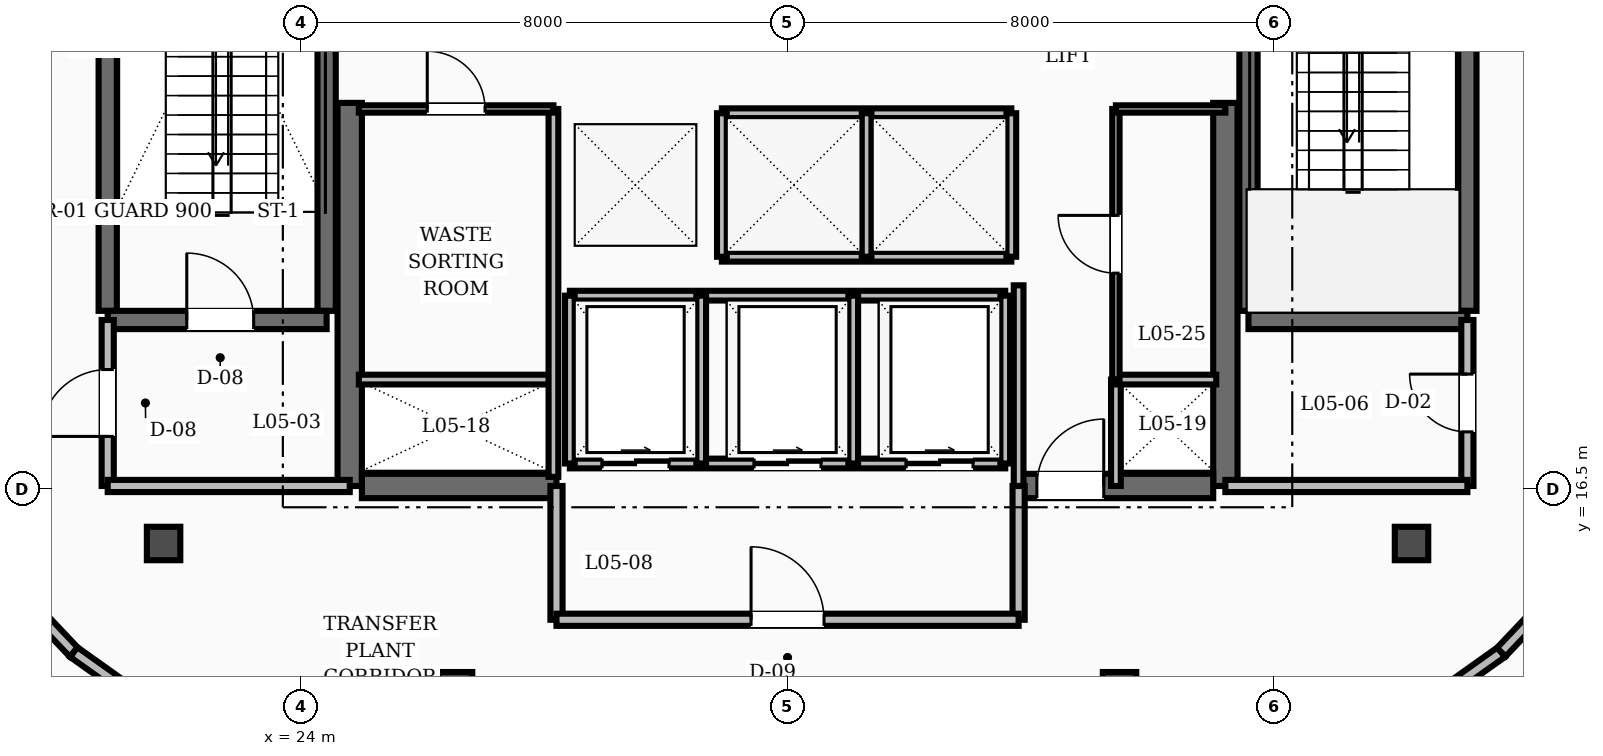
"""IFC4 building model, lengths in metres.
Left out: names, types, materials, properties, quantities, classifications, styles, units other than length and angle.
Written with IfcOpenShell. Run it as: python <this file> out.ifc"""

import sys

from ifc_helpers import new_model, si_unit, direction, frame, frame_2d, origin, place, context, subcontext, project, spatial, rectangle, extrude, element, fill, save


model = new_model("IFC4")
c1 = context("Model", 3, precision=1e-05, world=origin(), true_north=direction((0.0, 1.0)))
c2 = subcontext(c1, "Body", "Model", "MODEL_VIEW")
j1 = project(units=[si_unit("LENGTHUNIT", "METRE"), si_unit("PLANEANGLEUNIT", "RADIAN")], contexts=[c1])
p1 = place(None, origin())
s1 = spatial("IfcSite", under=j1, at=p1, CompositionType="ELEMENT")
p2 = place(p1, origin())
s2 = spatial("IfcBuilding", under=s1, at=p2, CompositionType="ELEMENT")
p3 = place(p2, frame((0.0, 0.0, 24.4)))
s3 = spatial("IfcBuildingStorey", under=s2, at=p3, CompositionType="ELEMENT", Elevation=24.4)
for number, where, z_axis, x_axis in (
    (1, (24.8, 16.55, 0.0), (0.0, 0.0, 1.0), (0.0, 1.0, 0.0)),
    (2, (39.2, 16.55, 0.0), (0.0, 0.0, 1.0), (0.0, 1.0, 0.0)),
):
    element("IfcWall", number, at=place(p3, frame(where, z_axis=z_axis, x_axis=x_axis)), inside=s3, PredefinedType="SHEAR", context=c2, shape_type="SweptSolid", body=[
        extrude(rectangle(XDim=6.3, YDim=0.4, at=frame_2d((3.15, 0.0))), origin(), (0.0, 0.0, 1.0), 6.0),
    ])
p4 = place(p3, frame((25.0, 16.55, 0.0), z_axis=(0.0, 0.0, 1.0), x_axis=(1.0, 0.0, 0.0)))
e3 = element("IfcWall", 3, at=p4, inside=s3, PredefinedType="SHEAR", context=c2, shape_type="SweptSolid", body=[
    extrude(rectangle(XDim=3.2, YDim=0.4, at=frame_2d((1.6, 0.0))), origin(), (0.0, 0.0, 1.0), 6.0),
])
p5 = place(p3, frame((35.8, 16.55, 0.0), z_axis=(0.0, 0.0, 1.0), x_axis=(1.0, 0.0, 0.0)))
e4 = element("IfcWall", 4, at=p5, inside=s3, PredefinedType="SHEAR", context=c2, shape_type="SweptSolid", body=[
    extrude(rectangle(XDim=3.2, YDim=0.4, at=frame_2d((1.6, 0.0))), origin(), (0.0, 0.0, 1.0), 6.0),
])
p6 = place(p5, frame((0.3, 0.0, 0.0)))
e5 = element("IfcOpeningElement", 5, at=p6, cuts=e4, PredefinedType="OPENING", context=c2, shape_type="SweptSolid", body=[
    extrude(rectangle(XDim=1.1, YDim=2.1, at=frame_2d((0.55, 1.05))), frame((0.0, 0.21, 0.0), z_axis=(0.0, -1.0, 0.0), x_axis=(1.0, 0.0, 0.0)), (0.0, 0.0, 1.0), 0.42),
])
for number, where, z_axis, x_axis in (
    (6, (20.82, 19.43, 0.0), (0.0, 0.0, 1.0), (0.0, 1.0, 0.0)),
    (7, (24.42, 19.43, 0.0), (0.0, 0.0, 1.0), (0.0, 1.0, 0.0)),
):
    element("IfcWall", number, at=place(p3, frame(where, z_axis=z_axis, x_axis=x_axis)), inside=s3, PredefinedType="SHEAR", context=c2, shape_type="SweptSolid", body=[
        extrude(rectangle(XDim=8.74, YDim=0.3, at=frame_2d((4.37, 0.0))), origin(), (0.0, 0.0, 1.0), 6.0),
    ])
p7 = place(p3, frame((20.82, 19.28, 0.0), z_axis=(0.0, 0.0, 1.0), x_axis=(1.0, 0.0, 0.0)))
e8 = element("IfcWall", 8, at=p7, inside=s3, PredefinedType="SHEAR", context=c2, shape_type="SweptSolid", body=[
    extrude(rectangle(XDim=3.6, YDim=0.3, at=frame_2d((1.8, 0.0))), origin(), (0.0, 0.0, 1.0), 6.0),
])
p8 = place(p7, frame((1.3, 0.0, 0.0)))
e9 = element("IfcOpeningElement", 9, at=p8, cuts=e8, PredefinedType="OPENING", context=c2, shape_type="SweptSolid", body=[
    extrude(rectangle(XDim=1.1, YDim=2.1, at=frame_2d((0.55, 1.05))), frame((0.0, 0.16, 0.0), z_axis=(0.0, -1.0, 0.0), x_axis=(1.0, 0.0, 0.0)), (0.0, 0.0, 1.0), 0.32),
])
for number, where, z_axis, x_axis in (
    (10, (43.18, 19.43, 0.0), (0.0, 0.0, 1.0), (0.0, 1.0, 0.0)),
    (11, (39.58, 19.43, 0.0), (0.0, 0.0, 1.0), (0.0, 1.0, 0.0)),
):
    element("IfcWall", number, at=place(p3, frame(where, z_axis=z_axis, x_axis=x_axis)), inside=s3, PredefinedType="SHEAR", context=c2, shape_type="SweptSolid", body=[
        extrude(rectangle(XDim=8.74, YDim=0.3, at=frame_2d((4.37, 0.0))), origin(), (0.0, 0.0, 1.0), 6.0),
    ])
p9 = place(p3, frame((39.58, 19.28, 0.0), z_axis=(0.0, 0.0, 1.0), x_axis=(1.0, 0.0, 0.0)))
e12 = element("IfcWall", 12, at=p9, inside=s3, PredefinedType="SHEAR", context=c2, shape_type="SweptSolid", body=[
    extrude(rectangle(XDim=3.6, YDim=0.3, at=frame_2d((1.8, 0.0))), origin(), (0.0, 0.0, 1.0), 6.0),
])
p10 = place(p3, frame((20.82, 16.55, 0.0), z_axis=(0.0, 0.0, 1.0), x_axis=(0.0, 1.0, 0.0)))
e13 = element("IfcWall", 13, at=p10, inside=s3, PredefinedType="SOLIDWALL", context=c2, shape_type="SweptSolid", body=[
    extrude(rectangle(XDim=2.73, YDim=0.2, at=frame_2d((1.365, 0.0))), origin(), (0.0, 0.0, 1.0), 4.71),
])
p11 = place(p10, frame((0.815, 0.0, 0.0)))
e14 = element("IfcOpeningElement", 14, at=p11, cuts=e13, PredefinedType="OPENING", context=c2, shape_type="SweptSolid", body=[
    extrude(rectangle(XDim=1.1, YDim=2.1, at=frame_2d((0.55, 1.05))), frame((0.0, 0.11, 0.0), z_axis=(0.0, -1.0, 0.0), x_axis=(1.0, 0.0, 0.0)), (0.0, 0.0, 1.0), 0.22),
])
p12 = place(p3, frame((20.82, 16.55, 0.0), z_axis=(0.0, 0.0, 1.0), x_axis=(1.0, 0.0, 0.0)))
e15 = element("IfcWall", 15, at=p12, inside=s3, PredefinedType="SOLIDWALL", context=c2, shape_type="SweptSolid", body=[
    extrude(rectangle(XDim=3.98, YDim=0.2, at=frame_2d((1.99, 0.0))), origin(), (0.0, 0.0, 1.0), 4.71),
])
p13 = place(p3, frame((43.18, 16.55, 0.0), z_axis=(0.0, 0.0, 1.0), x_axis=(0.0, 1.0, 0.0)))
e16 = element("IfcWall", 16, at=p13, inside=s3, PredefinedType="SOLIDWALL", context=c2, shape_type="SweptSolid", body=[
    extrude(rectangle(XDim=2.73, YDim=0.2, at=frame_2d((1.365, 0.0))), origin(), (0.0, 0.0, 1.0), 4.71),
])
p14 = place(p13, frame((0.89, 0.0, 0.0)))
e17 = element("IfcOpeningElement", 17, at=p14, cuts=e16, PredefinedType="OPENING", context=c2, shape_type="SweptSolid", body=[
    extrude(rectangle(XDim=0.95, YDim=2.1, at=frame_2d((0.475, 1.05))), frame((0.0, 0.11, 0.0), z_axis=(0.0, -1.0, 0.0), x_axis=(1.0, 0.0, 0.0)), (0.0, 0.0, 1.0), 0.22),
])
p15 = place(p3, frame((39.2, 16.55, 0.0), z_axis=(0.0, 0.0, 1.0), x_axis=(1.0, 0.0, 0.0)))
e18 = element("IfcWall", 18, at=p15, inside=s3, PredefinedType="SOLIDWALL", context=c2, shape_type="SweptSolid", body=[
    extrude(rectangle(XDim=3.98, YDim=0.2, at=frame_2d((1.99, 0.0))), origin(), (0.0, 0.0, 1.0), 4.71),
])
p16 = place(p3, frame((35.8, 16.55, 0.0), z_axis=(0.0, 0.0, 1.0), x_axis=(0.0, 1.0, 0.0)))
e19 = element("IfcWall", 19, at=p16, inside=s3, PredefinedType="SOLIDWALL", context=c2, shape_type="SweptSolid", body=[
    extrude(rectangle(XDim=3.3, YDim=0.16, at=frame_2d((1.65, 0.0))), origin(), (0.0, 0.0, 1.0), 4.71),
])
p17 = place(p3, frame((37.4, 16.55, 0.0), z_axis=(0.0, 0.0, 1.0), x_axis=(0.0, 1.0, 0.0)))
e20 = element("IfcWall", 20, at=p17, inside=s3, PredefinedType="SOLIDWALL", context=c2, shape_type="SweptSolid", body=[
    extrude(rectangle(XDim=1.75, YDim=0.16, at=frame_2d((0.875, 0.0))), origin(), (0.0, 0.0, 1.0), 4.71),
])
for number, where, z_axis, x_axis in (
    (21, (28.2, 14.35, 0.0), (0.0, 0.0, 1.0), (0.0, 1.0, 0.0)),
    (22, (35.8, 14.35, 0.0), (0.0, 0.0, 1.0), (0.0, 1.0, 0.0)),
):
    element("IfcWall", number, at=place(p3, frame(where, z_axis=z_axis, x_axis=x_axis)), inside=s3, PredefinedType="SOLIDWALL", context=c2, shape_type="SweptSolid", body=[
        extrude(rectangle(XDim=2.2, YDim=0.2, at=frame_2d((1.1, 0.0))), origin(), (0.0, 0.0, 1.0), 4.71),
    ])
p18 = place(p3, frame((28.2, 14.35, 0.0), z_axis=(0.0, 0.0, 1.0), x_axis=(1.0, 0.0, 0.0)))
e23 = element("IfcWall", 23, at=p18, inside=s3, PredefinedType="SOLIDWALL", context=c2, shape_type="SweptSolid", body=[
    extrude(rectangle(XDim=7.6, YDim=0.2, at=frame_2d((3.8, 0.0))), origin(), (0.0, 0.0, 1.0), 4.71),
])
p19 = place(p18, frame((3.2, 0.0, 0.0)))
e24 = element("IfcOpeningElement", 24, at=p19, cuts=e23, PredefinedType="OPENING", context=c2, shape_type="SweptSolid", body=[
    extrude(rectangle(XDim=1.2, YDim=2.1, at=frame_2d((0.6, 1.05))), frame((0.0, 0.11, 0.0), z_axis=(0.0, -1.0, 0.0), x_axis=(1.0, 0.0, 0.0)), (0.0, 0.0, 1.0), 0.22),
])
for number, where, z_axis, x_axis in (
    (25, (30.92, 22.68, 0.0), (0.0, 0.0, 1.0), (1.0, 0.0, 0.0)),
    (26, (30.92, 20.32, 0.0), (0.0, 0.0, 1.0), (1.0, 0.0, 0.0)),
):
    element("IfcWall", number, at=place(p3, frame(where, z_axis=z_axis, x_axis=x_axis)), inside=s3, PredefinedType="SOLIDWALL", context=c2, shape_type="SweptSolid", body=[
        extrude(rectangle(XDim=4.76, YDim=0.16, at=frame_2d((2.38, 0.0))), origin(), (0.0, 0.0, 1.0), 4.71),
    ])
for number, where, z_axis, x_axis in (
    (27, (30.92, 20.32, 0.0), (0.0, 0.0, 1.0), (0.0, 1.0, 0.0)),
    (28, (33.3, 20.32, 0.0), (0.0, 0.0, 1.0), (0.0, 1.0, 0.0)),
    (29, (35.68, 20.32, 0.0), (0.0, 0.0, 1.0), (0.0, 1.0, 0.0)),
):
    element("IfcWall", number, at=place(p3, frame(where, z_axis=z_axis, x_axis=x_axis)), inside=s3, PredefinedType="SOLIDWALL", context=c2, shape_type="SweptSolid", body=[
        extrude(rectangle(XDim=2.36, YDim=0.16, at=frame_2d((1.18, 0.0))), origin(), (0.0, 0.0, 1.0), 4.71),
    ])
p20 = place(p3, frame((28.42, 16.92, 0.0), z_axis=(0.0, 0.0, 1.0), x_axis=(1.0, 0.0, 0.0)))
e30 = element("IfcWall", 30, at=p20, inside=s3, PredefinedType="SOLIDWALL", context=c2, shape_type="SweptSolid", body=[
    extrude(rectangle(XDim=7.16, YDim=0.16, at=frame_2d((3.58, 0.0))), origin(), (0.0, 0.0, 1.0), 4.71),
])
p21 = place(p20, frame((0.53, 0.0, 0.0)))
e31 = element("IfcOpeningElement", 31, at=p21, cuts=e30, PredefinedType="OPENING", context=c2, shape_type="SweptSolid", body=[
    extrude(rectangle(XDim=1.1, YDim=2.15, at=frame_2d((0.55, 1.075))), frame((0.0, 0.09, 0.0), z_axis=(0.0, -1.0, 0.0), x_axis=(1.0, 0.0, 0.0)), (0.0, 0.0, 1.0), 0.18),
])
p22 = place(p20, frame((3.03, 0.0, 0.0)))
e32 = element("IfcOpeningElement", 32, at=p22, cuts=e30, PredefinedType="OPENING", context=c2, shape_type="SweptSolid", body=[
    extrude(rectangle(XDim=1.1, YDim=2.15, at=frame_2d((0.55, 1.075))), frame((0.0, 0.09, 0.0), z_axis=(0.0, -1.0, 0.0), x_axis=(1.0, 0.0, 0.0)), (0.0, 0.0, 1.0), 0.18),
])
p23 = place(p20, frame((5.53, 0.0, 0.0)))
e33 = element("IfcOpeningElement", 33, at=p23, cuts=e30, PredefinedType="OPENING", context=c2, shape_type="SweptSolid", body=[
    extrude(rectangle(XDim=1.1, YDim=2.15, at=frame_2d((0.55, 1.075))), frame((0.0, 0.09, 0.0), z_axis=(0.0, -1.0, 0.0), x_axis=(1.0, 0.0, 0.0)), (0.0, 0.0, 1.0), 0.18),
])
p24 = place(p3, frame((28.42, 19.68, 0.0), z_axis=(0.0, 0.0, 1.0), x_axis=(1.0, 0.0, 0.0)))
e34 = element("IfcWall", 34, at=p24, inside=s3, PredefinedType="SOLIDWALL", context=c2, shape_type="SweptSolid", body=[
    extrude(rectangle(XDim=7.16, YDim=0.16, at=frame_2d((3.58, 0.0))), origin(), (0.0, 0.0, 1.0), 4.71),
])
for number, where, z_axis, x_axis in (
    (35, (28.42, 16.92, 0.0), (0.0, 0.0, 1.0), (0.0, 1.0, 0.0)),
    (36, (30.58, 16.92, 0.0), (0.0, 0.0, 1.0), (0.0, 1.0, 0.0)),
    (37, (33.08, 16.92, 0.0), (0.0, 0.0, 1.0), (0.0, 1.0, 0.0)),
    (38, (35.58, 16.92, 0.0), (0.0, 0.0, 1.0), (0.0, 1.0, 0.0)),
):
    element("IfcWall", number, at=place(p3, frame(where, z_axis=z_axis, x_axis=x_axis)), inside=s3, PredefinedType="SOLIDWALL", context=c2, shape_type="SweptSolid", body=[
        extrude(rectangle(XDim=2.76, YDim=0.16, at=frame_2d((1.38, 0.0))), origin(), (0.0, 0.0, 1.0), 4.71),
    ])
p25 = place(p3, frame((24.95, 18.3, 0.0), z_axis=(0.0, 0.0, 1.0), x_axis=(1.0, 0.0, 0.0)))
e39 = element("IfcWall", 39, at=p25, inside=s3, PredefinedType="SOLIDWALL", context=c2, shape_type="SweptSolid", body=[
    extrude(rectangle(XDim=3.2, YDim=0.16, at=frame_2d((1.6, 0.0))), origin(), (0.0, 0.0, 1.0), 4.71),
])
p26 = place(p3, frame((28.15, 16.7, 0.0), z_axis=(0.0, 0.0, 1.0), x_axis=(0.0, 1.0, 0.0)))
e40 = element("IfcWall", 40, at=p26, inside=s3, PredefinedType="SOLIDWALL", context=c2, shape_type="SweptSolid", body=[
    extrude(rectangle(XDim=6.05, YDim=0.16, at=frame_2d((3.025, 0.0))), origin(), (0.0, 0.0, 1.0), 4.71),
])
p27 = place(p3, frame((37.4, 18.3, 0.0), z_axis=(0.0, 0.0, 1.0), x_axis=(1.0, 0.0, 0.0)))
e41 = element("IfcWall", 41, at=p27, inside=s3, PredefinedType="SOLIDWALL", context=c2, shape_type="SweptSolid", body=[
    extrude(rectangle(XDim=1.65, YDim=0.16, at=frame_2d((0.825, 0.0))), origin(), (0.0, 0.0, 1.0), 4.71),
])
p28 = place(p3, frame((24.95, 22.75, 0.0), z_axis=(0.0, 0.0, 1.0), x_axis=(1.0, 0.0, 0.0)))
e42 = element("IfcWall", 42, at=p28, inside=s3, PredefinedType="PARTITIONING", context=c2, shape_type="SweptSolid", body=[
    extrude(rectangle(XDim=3.2, YDim=0.12, at=frame_2d((1.6, 0.0))), origin(), (0.0, 0.0, 1.0), 4.71),
])
p29 = place(p28, frame((1.125, 0.0, 0.0)))
e43 = element("IfcOpeningElement", 43, at=p29, cuts=e42, PredefinedType="OPENING", context=c2, shape_type="SweptSolid", body=[
    extrude(rectangle(XDim=0.95, YDim=2.1, at=frame_2d((0.475, 1.05))), frame((0.0, 0.07, 0.0), z_axis=(0.0, -1.0, 0.0), x_axis=(1.0, 0.0, 0.0)), (0.0, 0.0, 1.0), 0.14),
])
p30 = place(p3, frame((37.4, 18.3, 0.0), z_axis=(0.0, 0.0, 1.0), x_axis=(0.0, 1.0, 0.0)))
e44 = element("IfcWall", 44, at=p30, inside=s3, PredefinedType="PARTITIONING", context=c2, shape_type="SweptSolid", body=[
    extrude(rectangle(XDim=4.45, YDim=0.12, at=frame_2d((2.225, 0.0))), origin(), (0.0, 0.0, 1.0), 4.71),
])
p31 = place(p30, frame((1.75, 0.0, 0.0)))
e45 = element("IfcOpeningElement", 45, at=p31, cuts=e44, PredefinedType="OPENING", context=c2, shape_type="SweptSolid", body=[
    extrude(rectangle(XDim=0.95, YDim=2.1, at=frame_2d((0.475, 1.05))), frame((0.0, 0.07, 0.0), z_axis=(0.0, -1.0, 0.0), x_axis=(1.0, 0.0, 0.0)), (0.0, 0.0, 1.0), 0.14),
])
p32 = place(p3, frame((37.4, 22.75, 0.0), z_axis=(0.0, 0.0, 1.0), x_axis=(1.0, 0.0, 0.0)))
e46 = element("IfcWall", 46, at=p32, inside=s3, PredefinedType="PARTITIONING", context=c2, shape_type="SweptSolid", body=[
    extrude(rectangle(XDim=1.8, YDim=0.12, at=frame_2d((0.9, 0.0))), origin(), (0.0, 0.0, 1.0), 4.71),
])
p33 = place(p3, frame((18.198, 16.0, 0.0), z_axis=(0.0, 0.0, 1.0), x_axis=(0.687248541225, -0.726422358263, 0.0)))
e47 = element("IfcWall", 47, at=p33, inside=s3, PredefinedType="SOLIDWALL", context=c2, shape_type="SweptSolid", body=[
    extrude(rectangle(XDim=3.004, YDim=0.2, at=frame_2d((1.502, 0.0))), origin(), (0.0, 0.0, 1.0), 4.71),
])
for number, where, z_axis, x_axis in (
    (48, (20.262, 13.818, 0.0), (0.0, 0.0, 1.0), (0.815, -0.58, 0.0)),
    (49, (41.222, 12.027, 0.0), (0.0, 0.0, 1.0), (0.815, 0.58, 0.0)),
):
    element("IfcWall", number, at=place(p3, frame(where, z_axis=z_axis, x_axis=x_axis)), inside=s3, PredefinedType="SOLIDWALL", context=c2, shape_type="SweptSolid", body=[
        extrude(rectangle(XDim=3.088, YDim=0.2, at=frame_2d((1.544, 0.0))), origin(), (0.0, 0.0, 1.0), 4.71),
    ])
p34 = place(p3, frame((43.738, 13.818, 0.0), z_axis=(0.0, 0.0, 1.0), x_axis=(0.687248541225, 0.726422358263, 0.0)))
e50 = element("IfcWall", 50, at=p34, inside=s3, PredefinedType="SOLIDWALL", context=c2, shape_type="SweptSolid", body=[
    extrude(rectangle(XDim=3.004, YDim=0.2, at=frame_2d((1.502, 0.0))), origin(), (0.0, 0.0, 1.0), 4.71),
])
p35 = place(p8, origin())
e51 = element("IfcDoor", 51, at=p35, inside=s3, OperationType="SINGLE_SWING_LEFT", PredefinedType="DOOR", context=c2, shape_type="SweptSolid", body=[
    extrude(rectangle(XDim=1.1, YDim=2.1, at=frame_2d((0.55, 1.05))), frame((0.0, 0.025, 0.0), z_axis=(0.0, -1.0, 0.0), x_axis=(1.0, 0.0, 0.0)), (0.0, 0.0, 1.0), 0.05),
])
fill(e9, e51)
p36 = place(p11, origin())
e52 = element("IfcDoor", 52, at=p36, inside=s3, OperationType="SINGLE_SWING_LEFT", PredefinedType="DOOR", context=c2, shape_type="SweptSolid", body=[
    extrude(rectangle(XDim=1.1, YDim=2.1, at=frame_2d((0.55, 1.05))), frame((0.0, 0.025, 0.0), z_axis=(0.0, -1.0, 0.0), x_axis=(1.0, 0.0, 0.0)), (0.0, 0.0, 1.0), 0.05),
])
fill(e14, e52)
p37 = place(p14, origin())
e53 = element("IfcDoor", 53, at=p37, inside=s3, OperationType="SINGLE_SWING_RIGHT", PredefinedType="DOOR", context=c2, shape_type="SweptSolid", body=[
    extrude(rectangle(XDim=0.95, YDim=2.1, at=frame_2d((0.475, 1.05))), frame((0.0, 0.025, 0.0), z_axis=(0.0, -1.0, 0.0), x_axis=(1.0, 0.0, 0.0)), (0.0, 0.0, 1.0), 0.05),
])
fill(e17, e53)
p38 = place(p6, origin())
e54 = element("IfcDoor", 54, at=p38, inside=s3, OperationType="SINGLE_SWING_RIGHT", PredefinedType="DOOR", context=c2, shape_type="SweptSolid", body=[
    extrude(rectangle(XDim=1.1, YDim=2.1, at=frame_2d((0.55, 1.05))), frame((0.0, 0.025, 0.0), z_axis=(0.0, -1.0, 0.0), x_axis=(1.0, 0.0, 0.0)), (0.0, 0.0, 1.0), 0.05),
])
fill(e5, e54)
p39 = place(p19, origin())
e55 = element("IfcDoor", 55, at=p39, inside=s3, OperationType="SINGLE_SWING_LEFT", PredefinedType="DOOR", context=c2, shape_type="SweptSolid", body=[
    extrude(rectangle(XDim=1.2, YDim=2.1, at=frame_2d((0.6, 1.05))), frame((0.0, 0.025, 0.0), z_axis=(0.0, -1.0, 0.0), x_axis=(1.0, 0.0, 0.0)), (0.0, 0.0, 1.0), 0.05),
])
fill(e24, e55)
p40 = place(p21, origin())
e56 = element("IfcDoor", 56, at=p40, inside=s3, OperationType="SLIDING_TO_RIGHT", PredefinedType="DOOR", context=c2, shape_type="SweptSolid", body=[
    extrude(rectangle(XDim=1.1, YDim=2.15, at=frame_2d((0.55, 1.075))), frame((0.0, 0.025, 0.0), z_axis=(0.0, -1.0, 0.0), x_axis=(1.0, 0.0, 0.0)), (0.0, 0.0, 1.0), 0.05),
])
fill(e31, e56)
p41 = place(p22, origin())
e57 = element("IfcDoor", 57, at=p41, inside=s3, OperationType="SLIDING_TO_RIGHT", PredefinedType="DOOR", context=c2, shape_type="SweptSolid", body=[
    extrude(rectangle(XDim=1.1, YDim=2.15, at=frame_2d((0.55, 1.075))), frame((0.0, 0.025, 0.0), z_axis=(0.0, -1.0, 0.0), x_axis=(1.0, 0.0, 0.0)), (0.0, 0.0, 1.0), 0.05),
])
fill(e32, e57)
p42 = place(p23, origin())
e58 = element("IfcDoor", 58, at=p42, inside=s3, OperationType="SLIDING_TO_RIGHT", PredefinedType="DOOR", context=c2, shape_type="SweptSolid", body=[
    extrude(rectangle(XDim=1.1, YDim=2.15, at=frame_2d((0.55, 1.075))), frame((0.0, 0.025, 0.0), z_axis=(0.0, -1.0, 0.0), x_axis=(1.0, 0.0, 0.0)), (0.0, 0.0, 1.0), 0.05),
])
fill(e33, e58)
p43 = place(p29, origin())
e59 = element("IfcDoor", 59, at=p43, inside=s3, OperationType="SINGLE_SWING_LEFT", PredefinedType="DOOR", context=c2, shape_type="SweptSolid", body=[
    extrude(rectangle(XDim=0.95, YDim=2.1, at=frame_2d((0.475, 1.05))), frame((0.0, 0.025, 0.0), z_axis=(0.0, -1.0, 0.0), x_axis=(1.0, 0.0, 0.0)), (0.0, 0.0, 1.0), 0.05),
])
fill(e43, e59)
p44 = place(p31, origin())
e60 = element("IfcDoor", 60, at=p44, inside=s3, OperationType="SINGLE_SWING_RIGHT", PredefinedType="DOOR", context=c2, shape_type="SweptSolid", body=[
    extrude(rectangle(XDim=0.95, YDim=2.1, at=frame_2d((0.475, 1.05))), frame((0.0, 0.025, 0.0), z_axis=(0.0, -1.0, 0.0), x_axis=(1.0, 0.0, 0.0)), (0.0, 0.0, 1.0), 0.05),
])
fill(e45, e60)
save(model, sys.argv[1])
